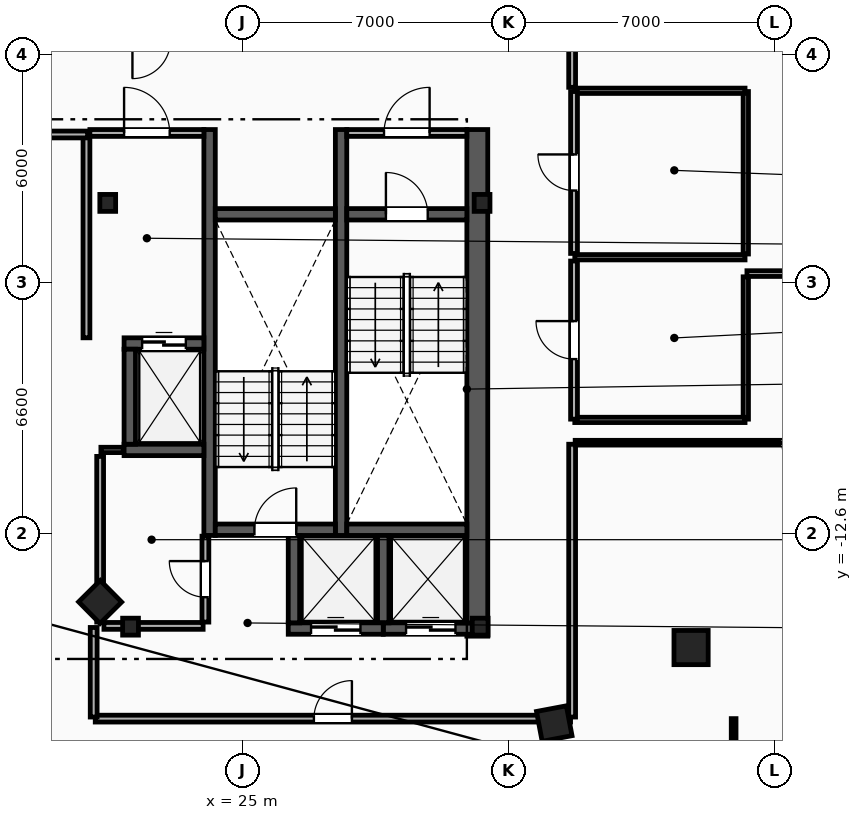
"""IFC4 building model, lengths in metres.
Left out: names, types, materials, properties, quantities, classifications, styles, units other than length and angle.
Written with IfcOpenShell. Run it as: python <this file> out.ifc"""

import sys

from ifc_helpers import new_model, si_unit, direction, frame, frame_2d, origin, origin_2d, place, context, subcontext, project, spatial, rectangle, i_section, extrude, element, fill, save


model = new_model("IFC4")
c1 = context("Model", 3, precision=1e-05, world=origin(), true_north=direction((0.0, 1.0)))
c2 = subcontext(c1, "Body", "Model", "MODEL_VIEW")
j1 = project(units=[si_unit("LENGTHUNIT", "METRE"), si_unit("PLANEANGLEUNIT", "RADIAN")], contexts=[c1])
p1 = place(None, origin())
s1 = spatial("IfcSite", under=j1, at=p1, CompositionType="ELEMENT")
p2 = place(p1, origin())
s2 = spatial("IfcBuilding", under=s1, at=p2, CompositionType="ELEMENT")
p3 = place(p2, frame((0.0, 0.0, 250.4)))
s3 = spatial("IfcBuildingStorey", under=s2, at=p3, CompositionType="ELEMENT", Elevation=250.4)
for number, where, z_axis, x_axis in (
    (1, (31.3, -3.9, 0.0), (0.0, 0.0, 1.0), (1.0, 0.0, 0.0)),
    (2, (21.45, -3.9, 0.0), (0.0, 0.0, 1.0), (1.0, 0.0, 0.0)),
    (3, (22.05, -15.05, 0.0), (0.0, 0.0, 1.0), (1.0, 0.0, 0.0)),
    (4, (31.25, -15.05, 0.0), (0.0, 0.0, 1.0), (1.0, 0.0, 0.0)),
):
    element("IfcColumn", number, at=place(p3, frame(where, z_axis=z_axis, x_axis=x_axis)), inside=s3, PredefinedType="COLUMN", context=c2, shape_type="SweptSolid", body=[
        extrude(i_section(OverallWidth=0.416, OverallDepth=0.446, WebThickness=0.039, FlangeThickness=0.063, FilletRadius=0.018, at=origin_2d()), origin(), (0.0, 0.0, 1.0), 3.6),
    ])
p4 = place(p3, frame((36.8, -15.6, 0.0), z_axis=(0.0, 0.0, 1.0), x_axis=(1.0, 0.0, 0.0)))
e5 = element("IfcColumn", 5, at=p4, inside=s3, PredefinedType="COLUMN", context=c2, shape_type="SweptSolid", body=[
    extrude(rectangle(XDim=0.9, YDim=0.9, at=origin_2d()), origin(), (0.0, 0.0, 1.0), 3.6),
])
for number, where, z_axis, x_axis in (
    (6, (21.25, -14.4, 0.0), (0.0, 0.0, 1.0), (0.703, -0.711, 0.0)),
    (7, (33.2, -17.6, 0.0), (0.0, 0.0, 1.0), (0.983, 0.186, 0.0)),
):
    element("IfcColumn", number, at=place(p3, frame(where, z_axis=z_axis, x_axis=x_axis)), inside=s3, PredefinedType="COLUMN", context=c2, shape_type="SweptSolid", body=[
        extrude(rectangle(XDim=0.8, YDim=0.8, at=origin_2d()), origin(), (0.0, 0.0, 1.0), 3.6),
    ])
p5 = place(p3, frame((31.175, -15.3, 0.0), z_axis=(0.0, 0.0, 1.0), x_axis=(0.0, 1.0, 0.0)))
e8 = element("IfcWall", 8, at=p5, inside=s3, PredefinedType="SHEAR", context=c2, shape_type="SweptSolid", body=[
    extrude(rectangle(XDim=13.33, YDim=0.55, at=frame_2d((6.665, 0.0))), origin(), (0.0, 0.0, 1.0), 3.34),
])
for number, where, z_axis, x_axis in (
    (9, (27.59, -12.65, 0.0), (0.0, 0.0, 1.0), (0.0, 1.0, 0.0)),
    (10, (24.13, -12.65, 0.0), (0.0, 0.0, 1.0), (0.0, 1.0, 0.0)),
):
    element("IfcWall", number, at=place(p3, frame(where, z_axis=z_axis, x_axis=x_axis)), inside=s3, PredefinedType="SHEAR", context=c2, shape_type="SweptSolid", body=[
        extrude(rectangle(XDim=10.68, YDim=0.3, at=frame_2d((5.34, 0.0))), origin(), (0.0, 0.0, 1.0), 3.34),
    ])
p6 = place(p3, frame((27.74, -4.2, 0.0), z_axis=(0.0, 0.0, 1.0), x_axis=(1.0, 0.0, 0.0)))
e11 = element("IfcWall", 11, at=p6, inside=s3, PredefinedType="SHEAR", context=c2, shape_type="SweptSolid", body=[
    extrude(rectangle(XDim=3.16, YDim=0.3, at=frame_2d((1.58, 0.0))), origin(), (0.0, 0.0, 1.0), 3.34),
])
p7 = place(p6, frame((1.03, 0.0, 0.0)))
e12 = element("IfcOpeningElement", 12, at=p7, cuts=e11, PredefinedType="OPENING", context=c2, shape_type="SweptSolid", body=[
    extrude(rectangle(XDim=1.1, YDim=2.15, at=frame_2d((0.55, 1.075))), frame((0.0, 0.16, 0.0), z_axis=(0.0, -1.0, 0.0), x_axis=(1.0, 0.0, 0.0)), (0.0, 0.0, 1.0), 0.32),
])
p8 = place(p3, frame((27.74, -12.5, 0.0), z_axis=(0.0, 0.0, 1.0), x_axis=(1.0, 0.0, 0.0)))
e13 = element("IfcWall", 13, at=p8, inside=s3, PredefinedType="SHEAR", context=c2, shape_type="SweptSolid", body=[
    extrude(rectangle(XDim=3.16, YDim=0.3, at=frame_2d((1.58, 0.0))), origin(), (0.0, 0.0, 1.0), 3.34),
])
p9 = place(p3, frame((24.28, -12.5, 0.0), z_axis=(0.0, 0.0, 1.0), x_axis=(1.0, 0.0, 0.0)))
e14 = element("IfcWall", 14, at=p9, inside=s3, PredefinedType="SHEAR", context=c2, shape_type="SweptSolid", body=[
    extrude(rectangle(XDim=3.16, YDim=0.3, at=frame_2d((1.58, 0.0))), origin(), (0.0, 0.0, 1.0), 3.34),
])
p10 = place(p9, frame((1.03, 0.0, 0.0)))
e15 = element("IfcOpeningElement", 15, at=p10, cuts=e14, PredefinedType="OPENING", context=c2, shape_type="SweptSolid", body=[
    extrude(rectangle(XDim=1.1, YDim=2.15, at=frame_2d((0.55, 1.075))), frame((0.0, 0.16, 0.0), z_axis=(0.0, -1.0, 0.0), x_axis=(1.0, 0.0, 0.0)), (0.0, 0.0, 1.0), 0.32),
])
p11 = place(p3, frame((24.28, -4.2, 0.0), z_axis=(0.0, 0.0, 1.0), x_axis=(1.0, 0.0, 0.0)))
e16 = element("IfcWall", 16, at=p11, inside=s3, PredefinedType="SHEAR", context=c2, shape_type="SweptSolid", body=[
    extrude(rectangle(XDim=3.16, YDim=0.3, at=frame_2d((1.58, 0.0))), origin(), (0.0, 0.0, 1.0), 3.34),
])
p12 = place(p3, frame((20.89, -7.45, 0.0), z_axis=(0.0, 0.0, 1.0), x_axis=(0.0, 1.0, 0.0)))
e17 = element("IfcWall", 17, at=p12, inside=s3, PredefinedType="PARTITIONING", context=c2, shape_type="SweptSolid", body=[
    extrude(rectangle(XDim=5.3, YDim=0.18, at=frame_2d((2.65, 0.0))), origin(), (0.0, 0.0, 1.0), 3.34),
])
p13 = place(p3, frame((20.98, -2.06, 0.0), z_axis=(0.0, 0.0, 1.0), x_axis=(1.0, 0.0, 0.0)))
e18 = element("IfcWall", 18, at=p13, inside=s3, PredefinedType="PARTITIONING", context=c2, shape_type="SweptSolid", body=[
    extrude(rectangle(XDim=3.0, YDim=0.18, at=frame_2d((1.5, 0.0))), origin(), (0.0, 0.0, 1.0), 3.34),
])
p14 = place(p13, frame((0.9, 0.0, 0.0)))
e19 = element("IfcOpeningElement", 19, at=p14, cuts=e18, PredefinedType="OPENING", context=c2, shape_type="SweptSolid", body=[
    extrude(rectangle(XDim=1.2, YDim=2.15, at=frame_2d((0.6, 1.075))), frame((0.0, 0.1, 0.0), z_axis=(0.0, -1.0, 0.0), x_axis=(1.0, 0.0, 0.0)), (0.0, 0.0, 1.0), 0.2),
])
p15 = place(p3, frame((27.74, -2.06, 0.0), z_axis=(0.0, 0.0, 1.0), x_axis=(1.0, 0.0, 0.0)))
e20 = element("IfcWall", 20, at=p15, inside=s3, PredefinedType="PARTITIONING", context=c2, shape_type="SweptSolid", body=[
    extrude(rectangle(XDim=3.16, YDim=0.18, at=frame_2d((1.58, 0.0))), origin(), (0.0, 0.0, 1.0), 3.34),
])
p16 = place(p15, frame((0.98, 0.0, 0.0)))
e21 = element("IfcOpeningElement", 21, at=p16, cuts=e20, PredefinedType="OPENING", context=c2, shape_type="SweptSolid", body=[
    extrude(rectangle(XDim=1.2, YDim=2.15, at=frame_2d((0.6, 1.075))), frame((0.0, 0.1, 0.0), z_axis=(0.0, -1.0, 0.0), x_axis=(1.0, 0.0, 0.0)), (0.0, 0.0, 1.0), 0.2),
])
p17 = place(p3, frame((21.88, -7.6, 0.0), z_axis=(0.0, 0.0, 1.0), x_axis=(1.0, 0.0, 0.0)))
e22 = element("IfcWall", 22, at=p17, inside=s3, PredefinedType="SHEAR", context=c2, shape_type="SweptSolid", body=[
    extrude(rectangle(XDim=2.1, YDim=0.3, at=frame_2d((1.05, 0.0))), origin(), (0.0, 0.0, 1.0), 3.34),
])
p18 = place(p17, frame((0.475, 0.0, 0.0)))
e23 = element("IfcOpeningElement", 23, at=p18, cuts=e22, PredefinedType="OPENING", context=c2, shape_type="SweptSolid", body=[
    extrude(rectangle(XDim=1.15, YDim=2.2, at=frame_2d((0.575, 1.1))), frame((0.0, 0.16, 0.0), z_axis=(0.0, -1.0, 0.0), x_axis=(1.0, 0.0, 0.0)), (0.0, 0.0, 1.0), 0.32),
])
p19 = place(p3, frame((21.88, -10.4, 0.0), z_axis=(0.0, 0.0, 1.0), x_axis=(1.0, 0.0, 0.0)))
e24 = element("IfcWall", 24, at=p19, inside=s3, PredefinedType="SHEAR", context=c2, shape_type="SweptSolid", body=[
    extrude(rectangle(XDim=2.1, YDim=0.3, at=frame_2d((1.05, 0.0))), origin(), (0.0, 0.0, 1.0), 3.34),
])
p20 = place(p3, frame((22.03, -10.25, 0.0), z_axis=(0.0, 0.0, 1.0), x_axis=(0.0, 1.0, 0.0)))
e25 = element("IfcWall", 25, at=p20, inside=s3, PredefinedType="SHEAR", context=c2, shape_type="SweptSolid", body=[
    extrude(rectangle(XDim=2.5, YDim=0.3, at=frame_2d((1.25, 0.0))), origin(), (0.0, 0.0, 1.0), 3.34),
])
p21 = place(p3, frame((28.7, -15.1, 0.0), z_axis=(0.0, 0.0, 1.0), x_axis=(1.0, 0.0, 0.0)))
e26 = element("IfcWall", 26, at=p21, inside=s3, PredefinedType="SHEAR", context=c2, shape_type="SweptSolid", body=[
    extrude(rectangle(XDim=2.5, YDim=0.3, at=frame_2d((1.25, 0.0))), origin(), (0.0, 0.0, 1.0), 3.34),
])
p22 = place(p21, frame((0.6, 0.0, 0.0)))
e27 = element("IfcOpeningElement", 27, at=p22, cuts=e26, PredefinedType="OPENING", context=c2, shape_type="SweptSolid", body=[
    extrude(rectangle(XDim=1.3, YDim=2.2, at=frame_2d((0.65, 1.1))), frame((0.0, 0.16, 0.0), z_axis=(0.0, -1.0, 0.0), x_axis=(1.0, 0.0, 0.0)), (0.0, 0.0, 1.0), 0.32),
])
p23 = place(p3, frame((28.7, -14.95, 0.0), z_axis=(0.0, 0.0, 1.0), x_axis=(0.0, 1.0, 0.0)))
e28 = element("IfcWall", 28, at=p23, inside=s3, PredefinedType="SHEAR", context=c2, shape_type="SweptSolid", body=[
    extrude(rectangle(XDim=2.3, YDim=0.3, at=frame_2d((1.15, 0.0))), origin(), (0.0, 0.0, 1.0), 3.34),
])
p24 = place(p3, frame((26.2, -15.1, 0.0), z_axis=(0.0, 0.0, 1.0), x_axis=(1.0, 0.0, 0.0)))
e29 = element("IfcWall", 29, at=p24, inside=s3, PredefinedType="SHEAR", context=c2, shape_type="SweptSolid", body=[
    extrude(rectangle(XDim=2.5, YDim=0.3, at=frame_2d((1.25, 0.0))), origin(), (0.0, 0.0, 1.0), 3.34),
])
p25 = place(p24, frame((0.6, 0.0, 0.0)))
e30 = element("IfcOpeningElement", 30, at=p25, cuts=e29, PredefinedType="OPENING", context=c2, shape_type="SweptSolid", body=[
    extrude(rectangle(XDim=1.3, YDim=2.2, at=frame_2d((0.65, 1.1))), frame((0.0, 0.16, 0.0), z_axis=(0.0, -1.0, 0.0), x_axis=(1.0, 0.0, 0.0)), (0.0, 0.0, 1.0), 0.32),
])
p26 = place(p3, frame((26.35, -14.95, 0.0), z_axis=(0.0, 0.0, 1.0), x_axis=(0.0, 1.0, 0.0)))
e31 = element("IfcWall", 31, at=p26, inside=s3, PredefinedType="SHEAR", context=c2, shape_type="SweptSolid", body=[
    extrude(rectangle(XDim=2.3, YDim=0.3, at=frame_2d((1.15, 0.0))), origin(), (0.0, 0.0, 1.0), 3.34),
])
p27 = place(p3, frame((21.27, -10.4, 0.0), z_axis=(0.0, 0.0, 1.0), x_axis=(1.0, 0.0, 0.0)))
e32 = element("IfcWall", 32, at=p27, inside=s3, PredefinedType="PARTITIONING", context=c2, shape_type="SweptSolid", body=[
    extrude(rectangle(XDim=0.59, YDim=0.14, at=frame_2d((0.295, 0.0))), origin(), (0.0, 0.0, 1.0), 3.34),
])
p28 = place(p3, frame((21.25, -14.93, 0.0), z_axis=(0.0, 0.0, 1.0), x_axis=(0.0, 1.0, 0.0)))
e33 = element("IfcWall", 33, at=p28, inside=s3, PredefinedType="PARTITIONING", context=c2, shape_type="SweptSolid", body=[
    extrude(rectangle(XDim=4.36, YDim=0.18, at=frame_2d((2.18, 0.0))), origin(), (0.0, 0.0, 1.0), 3.34),
])
p29 = place(p3, frame((21.35, -15.03, 0.0), z_axis=(0.0, 0.0, 1.0), x_axis=(1.0, 0.0, 0.0)))
e34 = element("IfcWall", 34, at=p29, inside=s3, PredefinedType="PARTITIONING", context=c2, shape_type="SweptSolid", body=[
    extrude(rectangle(XDim=2.61, YDim=0.18, at=frame_2d((1.305, 0.0))), origin(), (0.0, 0.0, 1.0), 2.413),
])
p30 = place(p3, frame((24.02, -14.93, 0.0), z_axis=(0.0, 0.0, 1.0), x_axis=(0.0, 1.0, 0.0)))
e35 = element("IfcWall", 35, at=p30, inside=s3, PredefinedType="PARTITIONING", context=c2, shape_type="SweptSolid", body=[
    extrude(rectangle(XDim=2.26, YDim=0.18, at=frame_2d((1.13, 0.0))), origin(), (0.0, 0.0, 1.0), 3.34),
])
p31 = place(p30, frame((0.655, 0.0, 0.0)))
e36 = element("IfcOpeningElement", 36, at=p31, cuts=e35, PredefinedType="OPENING", context=c2, shape_type="SweptSolid", body=[
    extrude(rectangle(XDim=0.95, YDim=2.1, at=frame_2d((0.475, 1.05))), frame((0.0, 0.1, 0.0), z_axis=(0.0, -1.0, 0.0), x_axis=(1.0, 0.0, 0.0)), (0.0, 0.0, 1.0), 0.2),
])
p32 = place(p3, frame((38.24, -9.59, 0.0), z_axis=(0.0, 0.0, 1.0), x_axis=(0.0, 1.0, 0.0)))
e37 = element("IfcWall", 37, at=p32, inside=s3, PredefinedType="PARTITIONING", context=c2, shape_type="SweptSolid", body=[
    extrude(rectangle(XDim=3.745, YDim=0.14, at=frame_2d((1.873, 0.0))), origin(), (0.0, 0.0, 1.0), 3.34),
])
p33 = place(p3, frame((38.24, -5.245, 0.0), z_axis=(0.0, 0.0, 1.0), x_axis=(0.0, 1.0, 0.0)))
e38 = element("IfcWall", 38, at=p33, inside=s3, PredefinedType="PARTITIONING", context=c2, shape_type="SweptSolid", body=[
    extrude(rectangle(XDim=4.275, YDim=0.14, at=frame_2d((2.138, 0.0))), origin(), (0.0, 0.0, 1.0), 3.34),
])
for number, where, z_axis, x_axis in (
    (39, (33.74, -0.95, 0.0), (0.0, 0.0, 1.0), (1.0, 0.0, 0.0)),
    (40, (33.74, -5.33, 0.0), (0.0, 0.0, 1.0), (1.0, 0.0, 0.0)),
    (41, (33.74, -9.61, 0.0), (0.0, 0.0, 1.0), (1.0, 0.0, 0.0)),
):
    element("IfcWall", number, at=place(p3, frame(where, z_axis=z_axis, x_axis=x_axis)), inside=s3, PredefinedType="PARTITIONING", context=c2, shape_type="SweptSolid", body=[
        extrude(rectangle(XDim=4.48, YDim=0.14, at=frame_2d((2.24, 0.0))), origin(), (0.0, 0.0, 1.0), 3.34),
    ])
p34 = place(p3, frame((33.72, -5.23, 0.0), z_axis=(0.0, 0.0, 1.0), x_axis=(0.0, 1.0, 0.0)))
e42 = element("IfcWall", 42, at=p34, inside=s3, PredefinedType="PARTITIONING", context=c2, shape_type="SweptSolid", body=[
    extrude(rectangle(XDim=4.26, YDim=0.18, at=frame_2d((2.13, 0.0))), origin(), (0.0, 0.0, 1.0), 3.34),
])
p35 = place(p34, frame((1.655, 0.0, 0.0)))
e43 = element("IfcOpeningElement", 43, at=p35, cuts=e42, PredefinedType="OPENING", context=c2, shape_type="SweptSolid", body=[
    extrude(rectangle(XDim=0.95, YDim=2.1, at=frame_2d((0.475, 1.05))), frame((0.0, 0.1, 0.0), z_axis=(0.0, -1.0, 0.0), x_axis=(1.0, 0.0, 0.0)), (0.0, 0.0, 1.0), 0.2),
])
p36 = place(p3, frame((33.72, -9.59, 0.0), z_axis=(0.0, 0.0, 1.0), x_axis=(0.0, 1.0, 0.0)))
e44 = element("IfcWall", 44, at=p36, inside=s3, PredefinedType="PARTITIONING", context=c2, shape_type="SweptSolid", body=[
    extrude(rectangle(XDim=4.16, YDim=0.18, at=frame_2d((2.08, 0.0))), origin(), (0.0, 0.0, 1.0), 3.34),
])
p37 = place(p36, frame((1.58, 0.0, 0.0)))
e45 = element("IfcOpeningElement", 45, at=p37, cuts=e44, PredefinedType="OPENING", context=c2, shape_type="SweptSolid", body=[
    extrude(rectangle(XDim=1.0, YDim=2.15, at=frame_2d((0.5, 1.075))), frame((0.0, 0.1, 0.0), z_axis=(0.0, -1.0, 0.0), x_axis=(1.0, 0.0, 0.0)), (0.0, 0.0, 1.0), 0.2),
])
p38 = place(p3, frame((38.27, -5.76, 0.0), z_axis=(0.0, 0.0, 1.0), x_axis=(1.0, 0.0, 0.0)))
e46 = element("IfcWall", 46, at=p38, inside=s3, PredefinedType="PARTITIONING", context=c2, shape_type="SweptSolid", body=[
    extrude(rectangle(XDim=12.584, YDim=0.15, at=frame_2d((6.292, 0.0))), origin(), (0.0, 0.0, 1.0), 3.34),
])
p39 = place(p3, frame((37.92, -24.36, 0.0), z_axis=(0.0, 0.0, 1.0), x_axis=(0.0, 1.0, 0.0)))
e47 = element("IfcWall", 47, at=p39, inside=s3, PredefinedType="PARTITIONING", context=c2, shape_type="SweptSolid", body=[
    extrude(rectangle(XDim=6.89, YDim=0.125, at=frame_2d((3.445, 0.0))), origin(), (0.0, 0.0, 1.0), 3.34),
])
p40 = place(p3, frame((21.122, -17.47, 0.0), z_axis=(0.0, 0.0, 1.0), x_axis=(1.0, 0.0, 0.0)))
e48 = element("IfcWall", 48, at=p40, inside=s3, PredefinedType="PARTITIONING", context=c2, shape_type="SweptSolid", body=[
    extrude(rectangle(XDim=12.507, YDim=0.18, at=frame_2d((6.253, 0.0))), origin(), (0.0, 0.0, 1.0), 3.34),
])
p41 = place(p40, frame((5.753, 0.0, 0.0)))
e49 = element("IfcOpeningElement", 49, at=p41, cuts=e48, PredefinedType="OPENING", context=c2, shape_type="SweptSolid", body=[
    extrude(rectangle(XDim=1.0, YDim=2.15, at=frame_2d((0.5, 1.075))), frame((0.0, 0.1, 0.0), z_axis=(0.0, -1.0, 0.0), x_axis=(1.0, 0.0, 0.0)), (0.0, 0.0, 1.0), 0.2),
])
p42 = place(p3, frame((13.521, -2.1, 0.0), z_axis=(0.0, 0.0, 1.0), x_axis=(1.0, 0.0, 0.0)))
e50 = element("IfcWall", 50, at=p42, inside=s3, PredefinedType="PARTITIONING", context=c2, shape_type="SweptSolid", body=[
    extrude(rectangle(XDim=7.398, YDim=0.18, at=frame_2d((3.699, 0.0))), origin(), (0.0, 0.0, 1.0), 3.34),
])
p43 = place(p3, frame((33.67, -17.428, 0.0), z_axis=(0.0, 0.0, 1.0), x_axis=(0.0, 1.0, 0.0)))
e51 = element("IfcWall", 51, at=p43, inside=s3, PredefinedType="PARTITIONING", context=c2, shape_type="SweptSolid", body=[
    extrude(rectangle(XDim=7.178, YDim=0.18, at=frame_2d((3.589, 0.0))), origin(), (0.0, 0.0, 1.0), 3.34),
])
p44 = place(p3, frame((21.08, -15.072, 0.0), z_axis=(0.0, 0.0, 1.0), x_axis=(0.0, -1.0, 0.0)))
e52 = element("IfcWall", 52, at=p44, inside=s3, PredefinedType="PARTITIONING", context=c2, shape_type="SweptSolid", body=[
    extrude(rectangle(XDim=2.357, YDim=0.18, at=frame_2d((1.178, 0.0))), origin(), (0.0, 0.0, 1.0), 3.34),
])
p45 = place(p3, frame((33.67, -0.859, 0.0), z_axis=(0.0, 0.0, 1.0), x_axis=(0.0, 1.0, 0.0)))
e53 = element("IfcWall", 53, at=p45, inside=s3, PredefinedType="PARTITIONING", context=c2, shape_type="SweptSolid", body=[
    extrude(rectangle(XDim=1.187, YDim=0.18, at=frame_2d((0.594, 0.0))), origin(), (0.0, 0.0, 1.0), 3.34),
])
p46 = place(p3, frame((50.191, -10.21, 0.0), z_axis=(0.0, 0.0, 1.0), x_axis=(-1.0, 0.0, 0.0)))
e54 = element("IfcWall", 54, at=p46, inside=s3, PredefinedType="PARTITIONING", context=c2, shape_type="SweptSolid", body=[
    extrude(rectangle(XDim=16.441, YDim=0.125, at=frame_2d((8.221, 0.0))), origin(), (0.0, 0.0, 1.0), 3.34),
])
p47 = place(p46, frame((10.001, 0.0, 0.0)))
e55 = element("IfcOpeningElement", 55, at=p47, cuts=e54, PredefinedType="OPENING", context=c2, shape_type="SweptSolid", body=[
    extrude(rectangle(XDim=1.0, YDim=2.15, at=frame_2d((0.5, 1.075))), frame((0.0, 0.073, 0.0), z_axis=(0.0, -1.0, 0.0), x_axis=(1.0, 0.0, 0.0)), (0.0, 0.0, 1.0), 0.145),
])
p48 = place(p7, origin())
e56 = element("IfcDoor", 56, at=p48, inside=s3, OperationType="SINGLE_SWING_LEFT", PredefinedType="DOOR", context=c2, shape_type="SweptSolid", body=[
    extrude(rectangle(XDim=1.1, YDim=2.15, at=frame_2d((0.55, 1.075))), frame((0.0, 0.025, 0.0), z_axis=(0.0, -1.0, 0.0), x_axis=(1.0, 0.0, 0.0)), (0.0, 0.0, 1.0), 0.05),
])
fill(e12, e56)
p49 = place(p10, origin())
e57 = element("IfcDoor", 57, at=p49, inside=s3, OperationType="SINGLE_SWING_RIGHT", PredefinedType="DOOR", context=c2, shape_type="SweptSolid", body=[
    extrude(rectangle(XDim=1.1, YDim=2.15, at=frame_2d((0.55, 1.075))), frame((0.0, 0.025, 0.0), z_axis=(0.0, -1.0, 0.0), x_axis=(1.0, 0.0, 0.0)), (0.0, 0.0, 1.0), 0.05),
])
fill(e15, e57)
p50 = place(p14, origin())
e58 = element("IfcDoor", 58, at=p50, inside=s3, OperationType="SINGLE_SWING_LEFT", PredefinedType="DOOR", context=c2, shape_type="SweptSolid", body=[
    extrude(rectangle(XDim=1.2, YDim=2.15, at=frame_2d((0.6, 1.075))), frame((0.0, 0.025, 0.0), z_axis=(0.0, -1.0, 0.0), x_axis=(1.0, 0.0, 0.0)), (0.0, 0.0, 1.0), 0.05),
])
fill(e19, e58)
p51 = place(p16, origin())
e59 = element("IfcDoor", 59, at=p51, inside=s3, OperationType="SINGLE_SWING_RIGHT", PredefinedType="DOOR", context=c2, shape_type="SweptSolid", body=[
    extrude(rectangle(XDim=1.2, YDim=2.15, at=frame_2d((0.6, 1.075))), frame((0.0, 0.025, 0.0), z_axis=(0.0, -1.0, 0.0), x_axis=(1.0, 0.0, 0.0)), (0.0, 0.0, 1.0), 0.05),
])
fill(e21, e59)
p52 = place(p18, origin())
e60 = element("IfcDoor", 60, at=p52, inside=s3, OperationType="SLIDING_TO_LEFT", PredefinedType="TRAPDOOR", context=c2, shape_type="SweptSolid", body=[
    extrude(rectangle(XDim=1.15, YDim=2.2, at=frame_2d((0.575, 1.1))), frame((0.0, 0.025, 0.0), z_axis=(0.0, -1.0, 0.0), x_axis=(1.0, 0.0, 0.0)), (0.0, 0.0, 1.0), 0.05),
])
fill(e23, e60)
p53 = place(p22, origin())
e61 = element("IfcDoor", 61, at=p53, inside=s3, OperationType="SLIDING_TO_LEFT", PredefinedType="TRAPDOOR", context=c2, shape_type="SweptSolid", body=[
    extrude(rectangle(XDim=1.3, YDim=2.2, at=frame_2d((0.65, 1.1))), frame((0.0, 0.025, 0.0), z_axis=(0.0, -1.0, 0.0), x_axis=(1.0, 0.0, 0.0)), (0.0, 0.0, 1.0), 0.05),
])
fill(e27, e61)
p54 = place(p25, origin())
e62 = element("IfcDoor", 62, at=p54, inside=s3, OperationType="SLIDING_TO_LEFT", PredefinedType="TRAPDOOR", context=c2, shape_type="SweptSolid", body=[
    extrude(rectangle(XDim=1.3, YDim=2.2, at=frame_2d((0.65, 1.1))), frame((0.0, 0.025, 0.0), z_axis=(0.0, -1.0, 0.0), x_axis=(1.0, 0.0, 0.0)), (0.0, 0.0, 1.0), 0.05),
])
fill(e30, e62)
p55 = place(p47, origin())
e63 = element("IfcDoor", 63, at=p55, inside=s3, OperationType="SINGLE_SWING_LEFT", PredefinedType="DOOR", context=c2, shape_type="SweptSolid", body=[
    extrude(rectangle(XDim=1.0, YDim=2.15, at=frame_2d((0.5, 1.075))), frame((0.0, 0.025, 0.0), z_axis=(0.0, -1.0, 0.0), x_axis=(1.0, 0.0, 0.0)), (0.0, 0.0, 1.0), 0.05),
])
fill(e55, e63)
p56 = place(p41, origin())
e64 = element("IfcDoor", 64, at=p56, inside=s3, OperationType="SINGLE_SWING_RIGHT", PredefinedType="DOOR", context=c2, shape_type="SweptSolid", body=[
    extrude(rectangle(XDim=1.0, YDim=2.15, at=frame_2d((0.5, 1.075))), frame((0.0, 0.025, 0.0), z_axis=(0.0, -1.0, 0.0), x_axis=(1.0, 0.0, 0.0)), (0.0, 0.0, 1.0), 0.05),
])
fill(e49, e64)
p57 = place(p35, origin())
e65 = element("IfcDoor", 65, at=p57, inside=s3, OperationType="SINGLE_SWING_RIGHT", PredefinedType="DOOR", context=c2, shape_type="SweptSolid", body=[
    extrude(rectangle(XDim=0.95, YDim=2.1, at=frame_2d((0.475, 1.05))), frame((0.0, 0.025, 0.0), z_axis=(0.0, -1.0, 0.0), x_axis=(1.0, 0.0, 0.0)), (0.0, 0.0, 1.0), 0.05),
])
fill(e43, e65)
p58 = place(p37, origin())
e66 = element("IfcDoor", 66, at=p58, inside=s3, OperationType="SINGLE_SWING_RIGHT", PredefinedType="DOOR", context=c2, shape_type="SweptSolid", body=[
    extrude(rectangle(XDim=1.0, YDim=2.15, at=frame_2d((0.5, 1.075))), frame((0.0, 0.025, 0.0), z_axis=(0.0, -1.0, 0.0), x_axis=(1.0, 0.0, 0.0)), (0.0, 0.0, 1.0), 0.05),
])
fill(e45, e66)
p59 = place(p31, origin())
e67 = element("IfcDoor", 67, at=p59, inside=s3, OperationType="SINGLE_SWING_RIGHT", PredefinedType="DOOR", context=c2, shape_type="SweptSolid", body=[
    extrude(rectangle(XDim=0.95, YDim=2.1, at=frame_2d((0.475, 1.05))), frame((0.0, 0.025, 0.0), z_axis=(0.0, -1.0, 0.0), x_axis=(1.0, 0.0, 0.0)), (0.0, 0.0, 1.0), 0.05),
])
fill(e36, e67)
save(model, sys.argv[1])
